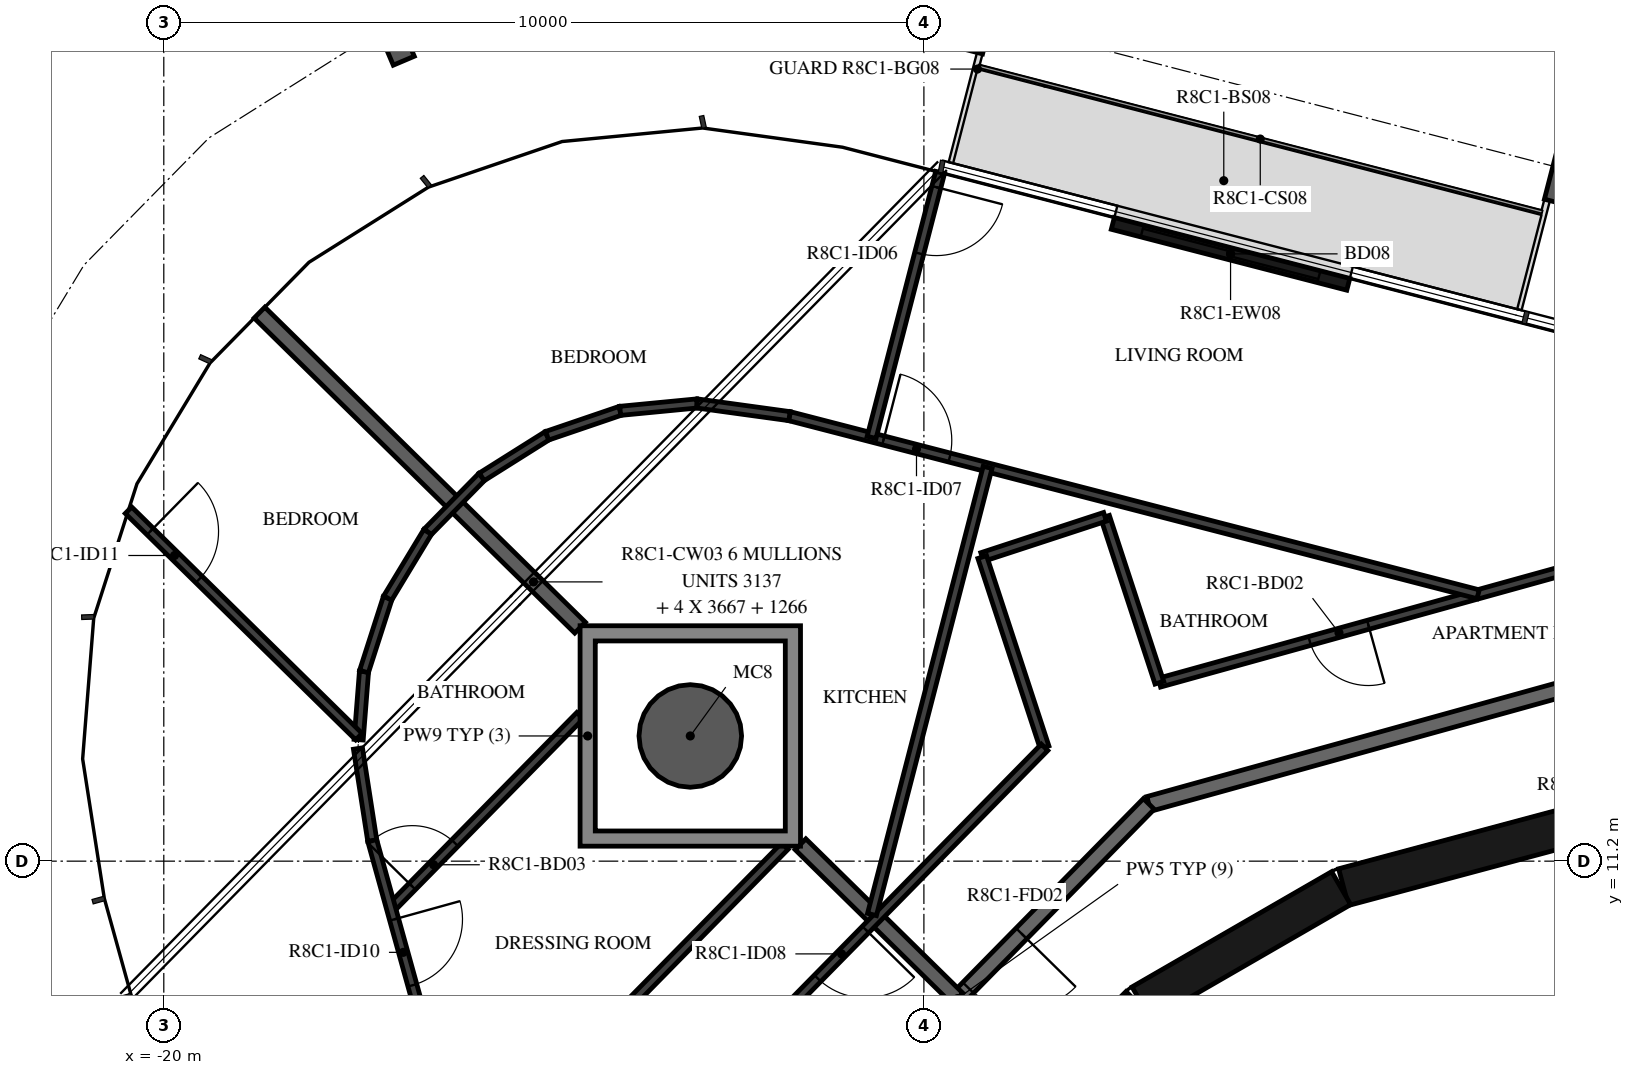
"""IFC4 building model, lengths in metres.
Left out: names, types, materials, properties, quantities, classifications, styles, units other than length and angle.
Written with IfcOpenShell. Run it as: python <this file> out.ifc"""

import sys

from ifc_helpers import new_model, si_unit, direction, frame, frame_2d, origin, origin_2d, place, context, subcontext, project, spatial, polyline, rectangle, hollow_circle, i_section, outline, extrude, element, fill, save


model = new_model("IFC4")
c1 = context("Model", 3, precision=1e-05, world=origin(), true_north=direction((0.0, 1.0)))
c2 = subcontext(c1, "Body", "Model", "MODEL_VIEW")
j1 = project(units=[si_unit("LENGTHUNIT", "METRE"), si_unit("PLANEANGLEUNIT", "RADIAN")], contexts=[c1])
p1 = place(None, origin())
s1 = spatial("IfcSite", under=j1, at=p1, CompositionType="ELEMENT")
p2 = place(p1, origin())
s2 = spatial("IfcBuilding", under=s1, at=p2, CompositionType="ELEMENT")
p3 = place(p2, frame((0.0, 0.0, 322.7)))
s3 = spatial("IfcBuildingStorey", under=s2, at=p3, CompositionType="ELEMENT", Elevation=322.7)
p4 = place(p3, frame((-13.073, 12.847, -0.38), z_axis=(0.0, 0.0, 1.0), x_axis=(1.0, 0.0, 0.0)))
e1 = element("IfcColumn", 1, at=p4, inside=s3, PredefinedType="COLUMN", context=c2, shape_type="SweptSolid", body=[
    extrude(hollow_circle(Radius=0.675, WallThickness=0.03, at=origin_2d()), origin(), (0.0, 0.0, 1.0), 2.616),
])
for number, where, z_axis, x_axis in (
    (2, (-1.579, 20.307, -0.38), (0.0, 0.0, 1.0), (0.968, -0.25, 0.0)),
    (3, (-9.261, 22.293, -0.38), (0.0, 0.0, 1.0), (0.968, -0.25, 0.0)),
    (4, (-17.019, 22.145, -0.38), (0.0, 0.0, 1.0), (0.921, 0.391, 0.0)),
):
    element("IfcColumn", number, at=place(p3, frame(where, z_axis=z_axis, x_axis=x_axis)), inside=s3, PredefinedType="COLUMN", context=c2, shape_type="SweptSolid", body=[
        extrude(i_section(OverallWidth=0.3, OverallDepth=0.9, WebThickness=0.019, FlangeThickness=0.035, FilletRadius=0.03, at=origin_2d()), origin(), (0.0, 0.0, 1.0), 2.616),
    ])
p5 = place(p3, frame((-4.417, 18.789, 0.0), z_axis=(0.0, 0.0, 1.0), x_axis=(-0.968140214764, 0.250408715017, 0.0)))
e5 = element("IfcWall", 5, at=p5, inside=s3, PredefinedType="STANDARD", context=c2, shape_type="SweptSolid", body=[
    extrude(rectangle(XDim=3.2, YDim=0.16, at=frame_2d((1.6, 0.0))), origin(), (0.0, 0.0, 1.0), 3.05),
])
p6 = place(p5, frame((0.4, 0.0, 0.0)))
e6 = element("IfcOpeningElement", 6, at=p6, cuts=e5, PredefinedType="OPENING", context=c2, shape_type="SweptSolid", body=[
    extrude(rectangle(XDim=2.4, YDim=2.4, at=frame_2d((1.2, 1.2))), frame((0.0, 0.09, 0.0), z_axis=(0.0, -1.0, 0.0), x_axis=(1.0, 0.0, 0.0)), (0.0, 0.0, 1.0), 0.18),
])
for number, where, z_axis, x_axis in (
    (7, (-1.55, 11.643, 0.0), (0.0, 0.0, 1.0), (-0.966, -0.259, 0.0)),
    (8, (-4.51, 10.845, 0.0), (0.0, 0.0, 1.0), (-0.866, -0.5, 0.0)),
):
    element("IfcWall", number, at=place(p3, frame(where, z_axis=z_axis, x_axis=x_axis)), inside=s3, PredefinedType="SHEAR", context=c2, shape_type="SweptSolid", body=[
        extrude(rectangle(XDim=3.033, YDim=0.5, at=frame_2d((1.516, 0.0))), origin(), (0.0, 0.0, 1.0), 3.05),
    ])
p7 = place(p3, frame((-7.164, 9.308, 0.0), z_axis=(0.0, 0.0, 1.0), x_axis=(-0.707106781187, -0.707106781187, 0.0)))
e9 = element("IfcWall", 9, at=p7, inside=s3, PredefinedType="SHEAR", context=c2, shape_type="SweptSolid", body=[
    extrude(rectangle(XDim=3.032, YDim=0.5, at=frame_2d((1.516, 0.0))), origin(), (0.0, 0.0, 1.0), 3.05),
])
p8 = place(p7, frame((1.416, 0.0, 0.0)))
e10 = element("IfcOpeningElement", 10, at=p8, cuts=e9, PredefinedType="OPENING", context=c2, shape_type="SweptSolid", body=[
    extrude(rectangle(XDim=1.2, YDim=2.1, at=frame_2d((0.6, 1.05))), frame((0.0, 0.26, 0.0), z_axis=(0.0, -1.0, 0.0), x_axis=(1.0, 0.0, 0.0)), (0.0, 0.0, 1.0), 0.52),
])
p9 = place(p3, frame((-0.121, 13.872, 0.0), z_axis=(0.0, 0.0, 1.0), x_axis=(-0.963625960674, -0.267254575108, 0.0)))
e11 = element("IfcWall", 11, at=p9, inside=s3, PredefinedType="STANDARD", context=c2, shape_type="SweptSolid", body=[
    extrude(rectangle(XDim=7.181, YDim=0.2, at=frame_2d((3.591, 0.0))), origin(), (0.0, 0.0, 1.0), 3.05),
])
p10 = place(p3, frame((-7.041, 11.953, 0.0), z_axis=(0.0, 0.0, 1.0), x_axis=(-0.70090916255, -0.713250549143, 0.0)))
e12 = element("IfcWall", 12, at=p10, inside=s3, PredefinedType="STANDARD", context=c2, shape_type="SweptSolid", body=[
    extrude(rectangle(XDim=7.181, YDim=0.2, at=frame_2d((3.59, 0.0))), origin(), (0.0, 0.0, 1.0), 3.05),
])
p11 = place(p10, frame((2.39, 0.0, 0.0)))
e13 = element("IfcOpeningElement", 13, at=p11, cuts=e12, PredefinedType="OPENING", context=c2, shape_type="SweptSolid", body=[
    extrude(rectangle(XDim=1.0, YDim=2.1, at=frame_2d((0.5, 1.05))), frame((0.0, 0.11, 0.0), z_axis=(0.0, -1.0, 0.0), x_axis=(1.0, 0.0, 0.0)), (0.0, 0.0, 1.0), 0.22),
])
p12 = place(p10, frame((3.791, 0.0, 0.0)))
e14 = element("IfcOpeningElement", 14, at=p12, cuts=e12, PredefinedType="OPENING", context=c2, shape_type="SweptSolid", body=[
    extrude(rectangle(XDim=1.0, YDim=2.1, at=frame_2d((0.5, 1.05))), frame((0.0, 0.11, 0.0), z_axis=(0.0, -1.0, 0.0), x_axis=(1.0, 0.0, 0.0)), (0.0, 0.0, 1.0), 0.22),
])
p13 = place(p3, frame((-11.623, 11.422, 0.0), z_axis=(0.0, 0.0, 1.0), x_axis=(0.713233657229, -0.700926351478, 0.0)))
e15 = element("IfcWall", 15, at=p13, inside=s3, PredefinedType="STANDARD", context=c2, shape_type="SweptSolid", body=[
    extrude(rectangle(XDim=2.896, YDim=0.2, at=frame_2d((1.448, 0.0))), origin(), (0.0, 0.0, 1.0), 3.05),
])
p14 = place(p3, frame((-18.741, 18.417, 0.0), z_axis=(0.0, 0.0, 1.0), x_axis=(0.713252414586, -0.700907264256, 0.0)))
e16 = element("IfcWall", 16, at=p14, inside=s3, PredefinedType="STANDARD", context=c2, shape_type="SweptSolid", body=[
    extrude(rectangle(XDim=5.913, YDim=0.2, at=frame_2d((2.957, 0.0))), origin(), (0.0, 0.0, 1.0), 3.05),
])
p15 = place(p3, frame((-0.135, 15.425, 0.0), z_axis=(0.0, 0.0, 1.0), x_axis=(-0.963625407294, -0.267256570392, 0.0)))
e17 = element("IfcWall", 17, at=p15, inside=s3, PredefinedType="PARTITIONING", context=c2, shape_type="SweptSolid", body=[
    extrude(rectangle(XDim=7.023, YDim=0.12, at=frame_2d((3.511, 0.0))), origin(), (0.0, 0.0, 1.0), 3.05),
])
p16 = place(p15, frame((4.171, 0.0, 0.0)))
e18 = element("IfcOpeningElement", 18, at=p16, cuts=e17, PredefinedType="OPENING", context=c2, shape_type="SweptSolid", body=[
    extrude(rectangle(XDim=0.8, YDim=2.1, at=frame_2d((0.4, 1.05))), frame((0.0, 0.07, 0.0), z_axis=(0.0, -1.0, 0.0), x_axis=(1.0, 0.0, 0.0)), (0.0, 0.0, 1.0), 0.14),
])
p17 = place(p3, frame((-6.902, 13.548, 0.0), z_axis=(0.0, 0.0, 1.0), x_axis=(-0.311311440769, 0.950307943167, 0.0)))
e19 = element("IfcWall", 19, at=p17, inside=s3, PredefinedType="PARTITIONING", context=c2, shape_type="SweptSolid", body=[
    extrude(rectangle(XDim=2.296, YDim=0.12, at=frame_2d((1.148, 0.0))), origin(), (0.0, 0.0, 1.0), 3.05),
])
p18 = place(p3, frame((-7.617, 15.73, 0.0), z_axis=(0.0, 0.0, 1.0), x_axis=(-0.950307562936, -0.311312601457, 0.0)))
e20 = element("IfcWall", 20, at=p18, inside=s3, PredefinedType="PARTITIONING", context=c2, shape_type="SweptSolid", body=[
    extrude(rectangle(XDim=1.7, YDim=0.12, at=frame_2d((0.85, 0.0))), origin(), (0.0, 0.0, 1.0), 3.05),
])
p19 = place(p3, frame((-9.233, 15.201, 0.0), z_axis=(0.0, 0.0, 1.0), x_axis=(0.311302357688, -0.950310918646, 0.0)))
e21 = element("IfcWall", 21, at=p19, inside=s3, PredefinedType="PARTITIONING", context=c2, shape_type="SweptSolid", body=[
    extrude(rectangle(XDim=2.634, YDim=0.12, at=frame_2d((1.317, 0.0))), origin(), (0.0, 0.0, 1.0), 3.05),
])
p20 = place(p3, frame((-8.413, 12.698, 0.0), z_axis=(0.0, 0.0, 1.0), x_axis=(-0.700901588882, -0.713257991686, 0.0)))
e22 = element("IfcWall", 22, at=p20, inside=s3, PredefinedType="PARTITIONING", context=c2, shape_type="SweptSolid", body=[
    extrude(rectangle(XDim=7.153, YDim=0.12, at=frame_2d((3.576, 0.0))), origin(), (0.0, 0.0, 1.0), 3.05),
])
p21 = place(p20, frame((3.36, 0.0, 0.0)))
e23 = element("IfcOpeningElement", 23, at=p21, cuts=e22, PredefinedType="OPENING", context=c2, shape_type="SweptSolid", body=[
    extrude(rectangle(XDim=0.9, YDim=2.1, at=frame_2d((0.45, 1.05))), frame((0.0, 0.07, 0.0), z_axis=(0.0, -1.0, 0.0), x_axis=(1.0, 0.0, 0.0)), (0.0, 0.0, 1.0), 0.14),
])
p22 = place(p3, frame((-11.769, 17.054, 0.0), z_axis=(0.0, 0.0, 1.0), x_axis=(0.968146475492, -0.250384508293, 0.0)))
e24 = element("IfcWall", 24, at=p22, inside=s3, PredefinedType="PARTITIONING", context=c2, shape_type="SweptSolid", body=[
    extrude(rectangle(XDim=9.359, YDim=0.12, at=frame_2d((4.679, 0.0))), origin(), (0.0, 0.0, 1.0), 3.05),
])
p23 = place(p22, frame((1.276, 0.0, 0.0)))
e25 = element("IfcOpeningElement", 25, at=p23, cuts=e24, PredefinedType="OPENING", context=c2, shape_type="SweptSolid", body=[
    extrude(rectangle(XDim=0.9, YDim=2.1, at=frame_2d((0.45, 1.05))), frame((0.0, 0.07, 0.0), z_axis=(0.0, -1.0, 0.0), x_axis=(1.0, 0.0, 0.0)), (0.0, 0.0, 1.0), 0.14),
])
p24 = place(p3, frame((-9.787, 20.26, 0.0), z_axis=(0.0, 0.0, 1.0), x_axis=(-0.250378438176, -0.968148045341, 0.0)))
e26 = element("IfcWall", 26, at=p24, inside=s3, PredefinedType="PARTITIONING", context=c2, shape_type="SweptSolid", body=[
    extrude(rectangle(XDim=3.6, YDim=0.12, at=frame_2d((1.8, 0.0))), origin(), (0.0, 0.0, 1.0), 3.05),
])
p25 = place(p24, frame((0.2, 0.0, 0.0)))
e27 = element("IfcOpeningElement", 27, at=p25, cuts=e26, PredefinedType="OPENING", context=c2, shape_type="SweptSolid", body=[
    extrude(rectangle(XDim=0.9, YDim=2.1, at=frame_2d((0.45, 1.05))), frame((0.0, 0.07, 0.0), z_axis=(0.0, -1.0, 0.0), x_axis=(1.0, 0.0, 0.0)), (0.0, 0.0, 1.0), 0.14),
])
p26 = place(p3, frame((-9.162, 16.38, 0.0), z_axis=(0.0, 0.0, 1.0), x_axis=(-0.250384770134, -0.968146407774, 0.0)))
e28 = element("IfcWall", 28, at=p26, inside=s3, PredefinedType="PARTITIONING", context=c2, shape_type="SweptSolid", body=[
    extrude(rectangle(XDim=6.076, YDim=0.12, at=frame_2d((3.038, 0.0))), origin(), (0.0, 0.0, 1.0), 3.05),
])
for number, where, z_axis, x_axis in (
    (29, (-16.529, 15.531, 0.0), (0.0, 0.0, 1.0), (0.701, 0.713, 0.0)),
    (30, (-15.817, 16.256, 0.0), (0.0, 0.0, 1.0), (0.847, 0.532, 0.0)),
    (31, (-14.957, 16.796, 0.0), (0.0, 0.0, 1.0), (0.946, 0.323, 0.0)),
    (32, (-13.996, 17.124, 0.0), (0.0, 0.0, 1.0), (0.995, 0.096, 0.0)),
):
    element("IfcWall", number, at=place(p3, frame(where, z_axis=z_axis, x_axis=x_axis)), inside=s3, PredefinedType="PARTITIONING", context=c2, shape_type="SweptSolid", body=[
        extrude(rectangle(XDim=1.016, YDim=0.12, at=frame_2d((0.508, 0.0))), origin(), (0.0, 0.0, 1.0), 3.05),
    ])
p27 = place(p3, frame((-12.984, 17.222, 0.0), z_axis=(0.0, 0.0, 1.0), x_axis=(0.990668432332, -0.136294010072, 0.0)))
e33 = element("IfcWall", 33, at=p27, inside=s3, PredefinedType="PARTITIONING", context=c2, shape_type="SweptSolid", body=[
    extrude(rectangle(XDim=1.227, YDim=0.12, at=frame_2d((0.614, 0.0))), origin(), (0.0, 0.0, 1.0), 3.05),
])
p28 = place(p3, frame((-17.437, 12.798, 0.0), z_axis=(0.0, 0.0, 1.0), x_axis=(0.078482315782, 0.996915506003, 0.0)))
e34 = element("IfcWall", 34, at=p28, inside=s3, PredefinedType="PARTITIONING", context=c2, shape_type="SweptSolid", body=[
    extrude(rectangle(XDim=0.899, YDim=0.12, at=frame_2d((0.449, 0.0))), origin(), (0.0, 0.0, 1.0), 3.05),
])
for number, where, z_axis, x_axis in (
    (35, (-17.366, 13.695, 0.0), (0.0, 0.0, 1.0), (0.306, 0.952, 0.0)),
    (36, (-17.055, 14.662, 0.0), (0.0, 0.0, 1.0), (0.517, 0.856, 0.0)),
):
    element("IfcWall", number, at=place(p3, frame(where, z_axis=z_axis, x_axis=x_axis)), inside=s3, PredefinedType="PARTITIONING", context=c2, shape_type="SweptSolid", body=[
        extrude(rectangle(XDim=1.016, YDim=0.12, at=frame_2d((0.508, 0.0))), origin(), (0.0, 0.0, 1.0), 3.05),
    ])
p29 = place(p3, frame((-20.465, 15.817, 0.0), z_axis=(0.0, 0.0, 1.0), x_axis=(0.713254811643, -0.700904824971, 0.0)))
e37 = element("IfcWall", 37, at=p29, inside=s3, PredefinedType="PARTITIONING", context=c2, shape_type="SweptSolid", body=[
    extrude(rectangle(XDim=4.25, YDim=0.12, at=frame_2d((2.125, 0.0))), origin(), (0.0, 0.0, 1.0), 3.05),
])
p30 = place(p29, frame((0.4, 0.0, 0.0)))
e38 = element("IfcOpeningElement", 38, at=p30, cuts=e37, PredefinedType="OPENING", context=c2, shape_type="SweptSolid", body=[
    extrude(rectangle(XDim=0.9, YDim=2.1, at=frame_2d((0.45, 1.05))), frame((0.0, 0.07, 0.0), z_axis=(0.0, -1.0, 0.0), x_axis=(1.0, 0.0, 0.0)), (0.0, 0.0, 1.0), 0.14),
])
p31 = place(p3, frame((-17.011, 10.582, 0.0), z_axis=(0.0, 0.0, 1.0), x_axis=(0.700924288011, 0.713235685083, 0.0)))
e39 = element("IfcWall", 39, at=p31, inside=s3, PredefinedType="PARTITIONING", context=c2, shape_type="SweptSolid", body=[
    extrude(rectangle(XDim=3.55, YDim=0.12, at=frame_2d((1.775, 0.0))), origin(), (0.0, 0.0, 1.0), 3.05),
])
p32 = place(p31, frame((0.4, 0.0, 0.0)))
e40 = element("IfcOpeningElement", 40, at=p32, cuts=e39, PredefinedType="OPENING", context=c2, shape_type="SweptSolid", body=[
    extrude(rectangle(XDim=0.8, YDim=2.1, at=frame_2d((0.4, 1.05))), frame((0.0, 0.07, 0.0), z_axis=(0.0, -1.0, 0.0), x_axis=(1.0, 0.0, 0.0)), (0.0, 0.0, 1.0), 0.14),
])
p33 = place(p3, frame((-17.446, 12.682, 0.0), z_axis=(0.0, 0.0, 1.0), x_axis=(0.153612025092, -0.988131239131, 0.0)))
e41 = element("IfcWall", 41, at=p33, inside=s3, PredefinedType="PARTITIONING", context=c2, shape_type="SweptSolid", body=[
    extrude(rectangle(XDim=1.227, YDim=0.12, at=frame_2d((0.614, 0.0))), origin(), (0.0, 0.0, 1.0), 3.05),
])
p34 = place(p3, frame((-17.257, 11.469, 0.0), z_axis=(0.0, 0.0, 1.0), x_axis=(0.267222501114, -0.963634855585, 0.0)))
e42 = element("IfcWall", 42, at=p34, inside=s3, PredefinedType="PARTITIONING", context=c2, shape_type="SweptSolid", body=[
    extrude(rectangle(XDim=7.232, YDim=0.12, at=frame_2d((3.616, 0.0))), origin(), (0.0, 0.0, 1.0), 3.05),
])
p35 = place(p34, frame((1.074, 0.0, 0.0)))
e43 = element("IfcOpeningElement", 43, at=p35, cuts=e42, PredefinedType="OPENING", context=c2, shape_type="SweptSolid", body=[
    extrude(rectangle(XDim=0.9, YDim=2.1, at=frame_2d((0.45, 1.05))), frame((0.0, 0.07, 0.0), z_axis=(0.0, -1.0, 0.0), x_axis=(1.0, 0.0, 0.0)), (0.0, 0.0, 1.0), 0.14),
])
p36 = place(p34, frame((4.682, 0.0, 0.0)))
e44 = element("IfcOpeningElement", 44, at=p36, cuts=e42, PredefinedType="OPENING", context=c2, shape_type="SweptSolid", body=[
    extrude(rectangle(XDim=0.9, YDim=2.1, at=frame_2d((0.45, 1.05))), frame((0.0, 0.07, 0.0), z_axis=(0.0, -1.0, 0.0), x_axis=(1.0, 0.0, 0.0)), (0.0, 0.0, 1.0), 0.14),
])
p37 = place(p3, frame((-16.047, 7.105, 0.0), z_axis=(0.0, 0.0, 1.0), x_axis=(0.700892382646, 0.713267038316, 0.0)))
e45 = element("IfcWall", 45, at=p37, inside=s3, PredefinedType="PARTITIONING", context=c2, shape_type="SweptSolid", body=[
    extrude(rectangle(XDim=6.017, YDim=0.12, at=frame_2d((3.009, 0.0))), origin(), (0.0, 0.0, 1.0), 3.05),
])
p38 = place(p37, frame((0.4, 0.0, 0.0)))
e46 = element("IfcOpeningElement", 46, at=p38, cuts=e45, PredefinedType="OPENING", context=c2, shape_type="SweptSolid", body=[
    extrude(rectangle(XDim=0.9, YDim=2.1, at=frame_2d((0.45, 1.05))), frame((0.0, 0.07, 0.0), z_axis=(0.0, -1.0, 0.0), x_axis=(1.0, 0.0, 0.0)), (0.0, 0.0, 1.0), 0.14),
])
p39 = place(p3, origin())
e47 = element("IfcWall", 47, at=p39, inside=s3, PredefinedType="STANDARD", context=c2, shape_type="SweptSolid", body=[
    extrude(outline(polyline([(-11.623, 14.297), (-11.623, 11.397), (-14.523, 11.397), (-14.523, 14.297), (-11.623, 14.297)]), holes=[polyline([(-14.323, 11.597), (-11.823, 11.597), (-11.823, 14.097), (-14.323, 14.097), (-14.323, 11.597)])]), origin(), (0.0, 0.0, 1.0), 3.05),
])
p40 = place(p6, origin())
e48 = element("IfcDoor", 48, at=p40, inside=s3, OperationType="DOUBLE_DOOR_SLIDING", PredefinedType="DOOR", context=c2, shape_type="SweptSolid", body=[
    extrude(rectangle(XDim=2.4, YDim=2.4, at=frame_2d((1.2, 1.2))), frame((0.0, 0.025, 0.0), z_axis=(0.0, -1.0, 0.0), x_axis=(1.0, 0.0, 0.0)), (0.0, 0.0, 1.0), 0.05),
])
fill(e6, e48)
p41 = place(p11, origin())
e49 = element("IfcDoor", 49, at=p41, inside=s3, OperationType="SINGLE_SWING_RIGHT", PredefinedType="DOOR", context=c2, shape_type="SweptSolid", body=[
    extrude(rectangle(XDim=1.0, YDim=2.1, at=frame_2d((0.5, 1.05))), frame((0.0, 0.025, 0.0), z_axis=(0.0, -1.0, 0.0), x_axis=(1.0, 0.0, 0.0)), (0.0, 0.0, 1.0), 0.05),
])
fill(e13, e49)
p42 = place(p16, origin())
e50 = element("IfcDoor", 50, at=p42, inside=s3, OperationType="SINGLE_SWING_RIGHT", PredefinedType="DOOR", context=c2, shape_type="SweptSolid", body=[
    extrude(rectangle(XDim=0.8, YDim=2.1, at=frame_2d((0.4, 1.05))), frame((0.0, 0.025, 0.0), z_axis=(0.0, -1.0, 0.0), x_axis=(1.0, 0.0, 0.0)), (0.0, 0.0, 1.0), 0.05),
])
fill(e18, e50)
p43 = place(p25, origin())
e51 = element("IfcDoor", 51, at=p43, inside=s3, OperationType="SINGLE_SWING_RIGHT", PredefinedType="DOOR", context=c2, shape_type="SweptSolid", body=[
    extrude(rectangle(XDim=0.9, YDim=2.1, at=frame_2d((0.45, 1.05))), frame((0.0, 0.025, 0.0), z_axis=(0.0, -1.0, 0.0), x_axis=(1.0, 0.0, 0.0)), (0.0, 0.0, 1.0), 0.05),
])
fill(e27, e51)
p44 = place(p23, origin())
e52 = element("IfcDoor", 52, at=p44, inside=s3, OperationType="SINGLE_SWING_LEFT", PredefinedType="DOOR", context=c2, shape_type="SweptSolid", body=[
    extrude(rectangle(XDim=0.9, YDim=2.1, at=frame_2d((0.45, 1.05))), frame((0.0, 0.025, 0.0), z_axis=(0.0, -1.0, 0.0), x_axis=(1.0, 0.0, 0.0)), (0.0, 0.0, 1.0), 0.05),
])
fill(e25, e52)
p45 = place(p21, origin())
e53 = element("IfcDoor", 53, at=p45, inside=s3, OperationType="SINGLE_SWING_LEFT", PredefinedType="DOOR", context=c2, shape_type="SweptSolid", body=[
    extrude(rectangle(XDim=0.9, YDim=2.1, at=frame_2d((0.45, 1.05))), frame((0.0, 0.025, 0.0), z_axis=(0.0, -1.0, 0.0), x_axis=(1.0, 0.0, 0.0)), (0.0, 0.0, 1.0), 0.05),
])
fill(e23, e53)
p46 = place(p32, origin())
e54 = element("IfcDoor", 54, at=p46, inside=s3, OperationType="SINGLE_SWING_LEFT", PredefinedType="DOOR", context=c2, shape_type="SweptSolid", body=[
    extrude(rectangle(XDim=0.8, YDim=2.1, at=frame_2d((0.4, 1.05))), frame((0.0, 0.025, 0.0), z_axis=(0.0, -1.0, 0.0), x_axis=(1.0, 0.0, 0.0)), (0.0, 0.0, 1.0), 0.05),
])
fill(e40, e54)
p47 = place(p35, origin())
e55 = element("IfcDoor", 55, at=p47, inside=s3, OperationType="SINGLE_SWING_LEFT", PredefinedType="DOOR", context=c2, shape_type="SweptSolid", body=[
    extrude(rectangle(XDim=0.9, YDim=2.1, at=frame_2d((0.45, 1.05))), frame((0.0, 0.025, 0.0), z_axis=(0.0, -1.0, 0.0), x_axis=(1.0, 0.0, 0.0)), (0.0, 0.0, 1.0), 0.05),
])
fill(e43, e55)
p48 = place(p30, origin())
e56 = element("IfcDoor", 56, at=p48, inside=s3, OperationType="SINGLE_SWING_LEFT", PredefinedType="DOOR", context=c2, shape_type="SweptSolid", body=[
    extrude(rectangle(XDim=0.9, YDim=2.1, at=frame_2d((0.45, 1.05))), frame((0.0, 0.025, 0.0), z_axis=(0.0, -1.0, 0.0), x_axis=(1.0, 0.0, 0.0)), (0.0, 0.0, 1.0), 0.05),
])
fill(e38, e56)
save(model, sys.argv[1])
